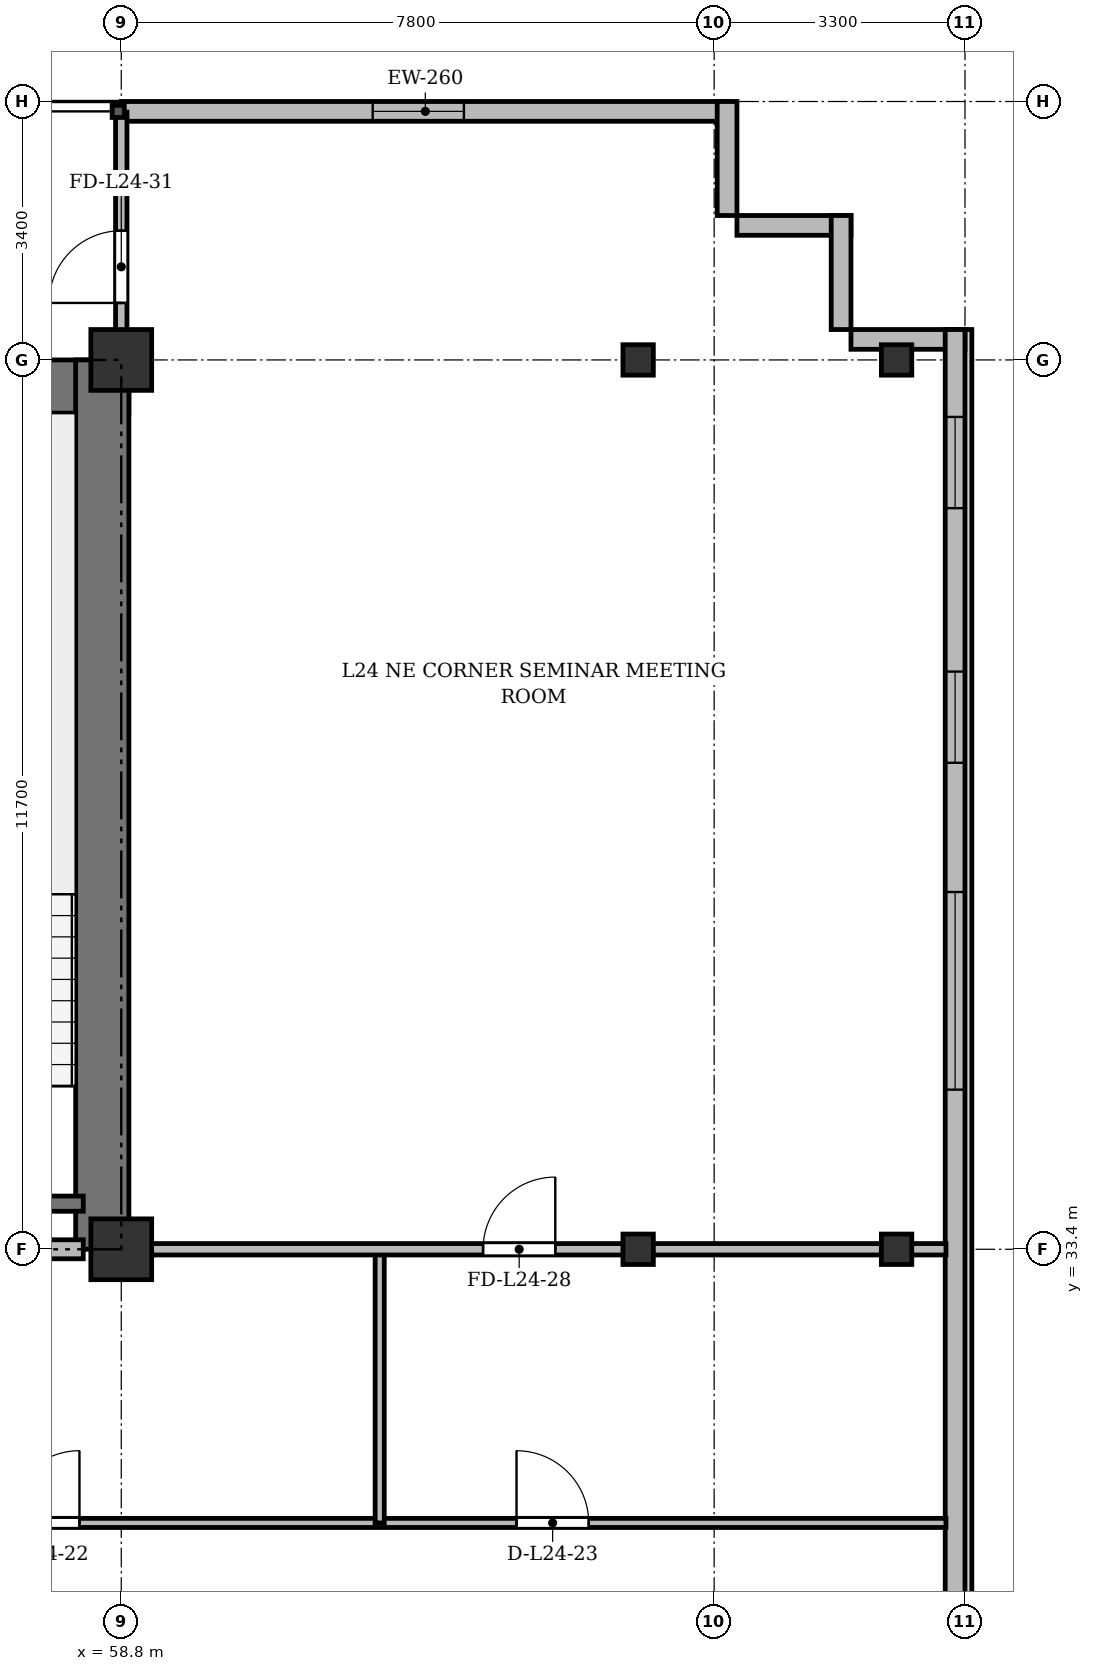
"""IFC4 building model, lengths in metres.
Left out: names, types, materials, properties, quantities, classifications, styles, units other than length and angle.
Written with IfcOpenShell. Run it as: python <this file> out.ifc"""

import sys

from ifc_helpers import new_model, si_unit, direction, frame, frame_2d, origin, origin_2d, place, context, subcontext, project, spatial, rectangle, i_section, extrude, source, transform, mapped, element, fill, save


model = new_model("IFC4")
c1 = context("Model", 3, precision=1e-05, world=origin(), true_north=direction((0.0, 1.0)))
c2 = subcontext(c1, "Body", "Model", "MODEL_VIEW")
j1 = project(units=[si_unit("LENGTHUNIT", "METRE"), si_unit("PLANEANGLEUNIT", "RADIAN")], contexts=[c1])
p1 = place(None, origin())
s1 = spatial("IfcSite", under=j1, at=p1, CompositionType="ELEMENT")
p2 = place(p1, origin())
s2 = spatial("IfcBuilding", under=s1, at=p2, CompositionType="ELEMENT")
p3 = place(p2, frame((0.0, 0.0, 96.1)))
s3 = spatial("IfcBuildingStorey", under=s2, at=p3, CompositionType="ELEMENT", Elevation=96.1)
m1 = source(origin(), c2, "Body", "SweptSolid", [
    extrude(rectangle(XDim=0.8, YDim=0.8, at=origin_2d()), origin(), (0.0, 0.0, 1.0), 3.6),
])
for number, where, z_axis, x_axis in (
    (1, (58.8, 33.4, 0.0), (0.0, 0.0, 1.0), (1.0, 0.0, 0.0)),
    (2, (58.8, 45.1, 0.0), (0.0, 0.0, 1.0), (1.0, 0.0, 0.0)),
):
    element("IfcColumn", number, at=place(p3, frame(where, z_axis=z_axis, x_axis=x_axis)), inside=s3, PredefinedType="COLUMN", context=c2, shape_type="MappedRepresentation", body=[
        mapped(m1, transform((0.0, 0.0, 0.0), x_axis=(1.0, 0.0, 0.0), y_axis=(0.0, 1.0, 0.0), z_axis=(0.0, 0.0, 1.0), scale=1.0)),
    ])
m2 = source(origin(), c2, "Body", "SweptSolid", [
    extrude(i_section(OverallWidth=0.4, OverallDepth=0.4, WebThickness=0.022, FlangeThickness=0.035, at=origin_2d()), origin(), (0.0, 0.0, 1.0), 3.6),
])
for number, where, z_axis, x_axis in (
    (3, (65.6, 33.4, 0.0), (0.0, 0.0, 1.0), (1.0, 0.0, 0.0)),
    (4, (65.6, 45.1, 0.0), (0.0, 0.0, 1.0), (1.0, 0.0, 0.0)),
    (5, (69.0, 33.4, 0.0), (0.0, 0.0, 1.0), (1.0, 0.0, 0.0)),
    (6, (69.0, 45.1, 0.0), (0.0, 0.0, 1.0), (1.0, 0.0, 0.0)),
):
    element("IfcColumn", number, at=place(p3, frame(where, z_axis=z_axis, x_axis=x_axis)), inside=s3, PredefinedType="COLUMN", context=c2, shape_type="MappedRepresentation", body=[
        mapped(m2, transform((0.0, 0.0, 0.0), x_axis=(1.0, 0.0, 0.0), y_axis=(0.0, 1.0, 0.0), z_axis=(0.0, 0.0, 1.0), scale=1.0)),
    ])
p4 = place(p3, frame((58.8, 48.37, 0.0), z_axis=(0.0, 0.0, 1.0), x_axis=(1.0, 0.0, 0.0)))
e7 = element("IfcWall", 7, at=p4, inside=s3, PredefinedType="SOLIDWALL", context=c2, shape_type="SweptSolid", body=[
    extrude(rectangle(XDim=8.0, YDim=0.26, at=frame_2d((4.0, 0.0))), origin(), (0.0, 0.0, 1.0), 3.34),
])
p5 = place(p4, frame((3.308, 0.0, 0.9)))
e8 = element("IfcOpeningElement", 8, at=p5, cuts=e7, PredefinedType="OPENING", context=c2, shape_type="SweptSolid", body=[
    extrude(rectangle(XDim=1.2, YDim=1.65, at=frame_2d((0.6, 0.825))), frame((0.0, 0.14, 0.0), z_axis=(0.0, -1.0, 0.0), x_axis=(1.0, 0.0, 0.0)), (0.0, 0.0, 1.0), 0.28),
])
for number, where, z_axis, x_axis in (
    (9, (66.77, 48.5, 0.0), (0.0, 0.0, 1.0), (0.0, -1.0, 0.0)),
    (10, (66.9, 46.87, 0.0), (0.0, 0.0, 1.0), (1.0, 0.0, 0.0)),
    (11, (68.27, 47.0, 0.0), (0.0, 0.0, 1.0), (0.0, -1.0, 0.0)),
):
    element("IfcWall", number, at=place(p3, frame(where, z_axis=z_axis, x_axis=x_axis)), inside=s3, PredefinedType="SOLIDWALL", context=c2, shape_type="SweptSolid", body=[
        extrude(rectangle(XDim=1.5, YDim=0.26, at=frame_2d((0.75, 0.0))), origin(), (0.0, 0.0, 1.0), 3.34),
    ])
p6 = place(p3, frame((68.4, 45.37, 0.0), z_axis=(0.0, 0.0, 1.0), x_axis=(1.0, 0.0, 0.0)))
e12 = element("IfcWall", 12, at=p6, inside=s3, PredefinedType="SOLIDWALL", context=c2, shape_type="SweptSolid", body=[
    extrude(rectangle(XDim=1.5, YDim=0.26, at=frame_2d((0.75, 0.0))), origin(), (0.0, 0.0, 1.0), 2.752),
])
p7 = place(p3, frame((69.77, 45.5, 0.0), z_axis=(0.0, 0.0, 1.0), x_axis=(0.0, -1.0, 0.0)))
e13 = element("IfcWall", 13, at=p7, inside=s3, PredefinedType="SOLIDWALL", context=c2, shape_type="SweptSolid", body=[
    extrude(rectangle(XDim=39.6, YDim=0.26, at=frame_2d((19.8, 0.0))), origin(), (0.0, 0.0, 1.0), 3.34),
])
p8 = place(p7, frame((36.95, 0.0, 0.92)))
e14 = element("IfcOpeningElement", 14, at=p8, cuts=e13, PredefinedType="OPENING", context=c2, shape_type="SweptSolid", body=[
    extrude(rectangle(XDim=1.2, YDim=1.65, at=frame_2d((0.6, 0.825))), frame((0.0, 0.14, 0.0), z_axis=(0.0, -1.0, 0.0), x_axis=(1.0, 0.0, 0.0)), (0.0, 0.0, 1.0), 0.28),
])
p9 = place(p7, frame((32.8, 0.0, 0.92)))
e15 = element("IfcOpeningElement", 15, at=p9, cuts=e13, PredefinedType="OPENING", context=c2, shape_type="SweptSolid", body=[
    extrude(rectangle(XDim=2.6, YDim=1.9, at=frame_2d((1.3, 0.95))), frame((0.0, 0.14, 0.0), z_axis=(0.0, -1.0, 0.0), x_axis=(1.0, 0.0, 0.0)), (0.0, 0.0, 1.0), 0.28),
])
p10 = place(p7, frame((28.6, 0.0, 0.92)))
e16 = element("IfcOpeningElement", 16, at=p10, cuts=e13, PredefinedType="OPENING", context=c2, shape_type="SweptSolid", body=[
    extrude(rectangle(XDim=2.6, YDim=1.9, at=frame_2d((1.3, 0.95))), frame((0.0, 0.14, 0.0), z_axis=(0.0, -1.0, 0.0), x_axis=(1.0, 0.0, 0.0)), (0.0, 0.0, 1.0), 0.28),
])
p11 = place(p7, frame((21.4, 0.0, 0.92)))
e17 = element("IfcOpeningElement", 17, at=p11, cuts=e13, PredefinedType="OPENING", context=c2, shape_type="SweptSolid", body=[
    extrude(rectangle(XDim=2.6, YDim=1.9, at=frame_2d((1.3, 0.95))), frame((0.0, 0.14, 0.0), z_axis=(0.0, -1.0, 0.0), x_axis=(1.0, 0.0, 0.0)), (0.0, 0.0, 1.0), 0.28),
])
p12 = place(p7, frame((7.4, 0.0, 0.92)))
e18 = element("IfcOpeningElement", 18, at=p12, cuts=e13, PredefinedType="OPENING", context=c2, shape_type="SweptSolid", body=[
    extrude(rectangle(XDim=2.6, YDim=1.9, at=frame_2d((1.3, 0.95))), frame((0.0, 0.14, 0.0), z_axis=(0.0, -1.0, 0.0), x_axis=(1.0, 0.0, 0.0)), (0.0, 0.0, 1.0), 0.28),
])
p13 = place(p7, frame((4.5, 0.0, 0.92)))
e19 = element("IfcOpeningElement", 19, at=p13, cuts=e13, PredefinedType="OPENING", context=c2, shape_type="SweptSolid", body=[
    extrude(rectangle(XDim=1.2, YDim=1.65, at=frame_2d((0.6, 0.825))), frame((0.0, 0.14, 0.0), z_axis=(0.0, -1.0, 0.0), x_axis=(1.0, 0.0, 0.0)), (0.0, 0.0, 1.0), 0.28),
])
p14 = place(p7, frame((1.15, 0.0, 0.92)))
e20 = element("IfcOpeningElement", 20, at=p14, cuts=e13, PredefinedType="OPENING", context=c2, shape_type="SweptSolid", body=[
    extrude(rectangle(XDim=1.2, YDim=1.65, at=frame_2d((0.6, 0.825))), frame((0.0, 0.14, 0.0), z_axis=(0.0, -1.0, 0.0), x_axis=(1.0, 0.0, 0.0)), (0.0, 0.0, 1.0), 0.28),
])
p15 = place(p3, frame((15.5, 44.75, 0.0), z_axis=(0.0, 0.0, 1.0), x_axis=(1.0, 0.0, 0.0)))
e21 = element("IfcWall", 21, at=p15, inside=s3, PredefinedType="SHEAR", context=c2, shape_type="SweptSolid", body=[
    extrude(rectangle(XDim=43.4, YDim=0.7, at=frame_2d((21.7, 0.0))), origin(), (0.0, 0.0, 1.0), 3.34),
])
p16 = place(p3, frame((58.55, 33.4, 0.0), z_axis=(0.0, 0.0, 1.0), x_axis=(0.0, 1.0, 0.0)))
e22 = element("IfcWall", 22, at=p16, inside=s3, PredefinedType="SHEAR", context=c2, shape_type="SweptSolid", body=[
    extrude(rectangle(XDim=11.7, YDim=0.7, at=frame_2d((5.85, 0.0))), origin(), (0.0, 0.0, 1.0), 3.34),
])
p17 = place(p3, frame((54.9, 34.0, 0.0), z_axis=(0.0, 0.0, 1.0), x_axis=(1.0, 0.0, 0.0)))
e23 = element("IfcWall", 23, at=p17, inside=s3, PredefinedType="SHEAR", context=c2, shape_type="SweptSolid", body=[
    extrude(rectangle(XDim=3.4, YDim=0.2, at=frame_2d((1.7, 0.0))), origin(), (0.0, 0.0, 1.0), 3.34),
])
p18 = place(p3, frame((47.15, 33.4, 0.0), z_axis=(0.0, 0.0, 1.0), x_axis=(1.0, 0.0, 0.0)))
e24 = element("IfcWall", 24, at=p18, inside=s3, PredefinedType="PARTITIONING", context=c2, shape_type="SweptSolid", body=[
    extrude(rectangle(XDim=11.15, YDim=0.25, at=frame_2d((5.575, 0.0))), origin(), (0.0, 0.0, 1.0), 2.752),
])
p19 = place(p18, frame((0.7, 0.0, 0.0)))
e25 = element("IfcOpeningElement", 25, at=p19, cuts=e24, PredefinedType="OPENING", context=c2, shape_type="SweptSolid", body=[
    extrude(rectangle(XDim=0.95, YDim=2.15, at=frame_2d((0.475, 1.075))), frame((0.0, 0.135, 0.0), z_axis=(0.0, -1.0, 0.0), x_axis=(1.0, 0.0, 0.0)), (0.0, 0.0, 1.0), 0.27),
])
p20 = place(p18, frame((6.0, 0.0, 0.0)))
e26 = element("IfcOpeningElement", 26, at=p20, cuts=e24, PredefinedType="OPENING", context=c2, shape_type="SweptSolid", body=[
    extrude(rectangle(XDim=1.2, YDim=2.15, at=frame_2d((0.6, 1.075))), frame((0.0, 0.135, 0.0), z_axis=(0.0, -1.0, 0.0), x_axis=(1.0, 0.0, 0.0)), (0.0, 0.0, 1.0), 0.27),
])
p21 = place(p3, frame((54.8, 29.8, 0.0), z_axis=(0.0, 0.0, 1.0), x_axis=(1.0, 0.0, 0.0)))
e27 = element("IfcWall", 27, at=p21, inside=s3, PredefinedType="PARTITIONING", context=c2, shape_type="SweptSolid", body=[
    extrude(rectangle(XDim=14.85, YDim=0.12, at=frame_2d((7.425, 0.0))), origin(), (0.0, 0.0, 1.0), 2.84),
])
p22 = place(p21, frame((2.5, 0.0, 0.0)))
e28 = element("IfcOpeningElement", 28, at=p22, cuts=e27, PredefinedType="OPENING", context=c2, shape_type="SweptSolid", body=[
    extrude(rectangle(XDim=0.95, YDim=2.15, at=frame_2d((0.475, 1.075))), frame((0.0, 0.07, 0.0), z_axis=(0.0, -1.0, 0.0), x_axis=(1.0, 0.0, 0.0)), (0.0, 0.0, 1.0), 0.14),
])
p23 = place(p21, frame((9.2, 0.0, 0.0)))
e29 = element("IfcOpeningElement", 29, at=p23, cuts=e27, PredefinedType="OPENING", context=c2, shape_type="SweptSolid", body=[
    extrude(rectangle(XDim=0.95, YDim=2.15, at=frame_2d((0.475, 1.075))), frame((0.0, 0.07, 0.0), z_axis=(0.0, -1.0, 0.0), x_axis=(1.0, 0.0, 0.0)), (0.0, 0.0, 1.0), 0.14),
])
p24 = place(p3, frame((62.2, 29.8, 0.0), z_axis=(0.0, 0.0, 1.0), x_axis=(0.0, 1.0, 0.0)))
e30 = element("IfcWall", 30, at=p24, inside=s3, PredefinedType="PARTITIONING", context=c2, shape_type="SweptSolid", body=[
    extrude(rectangle(XDim=3.6, YDim=0.12, at=frame_2d((1.8, 0.0))), origin(), (0.0, 0.0, 1.0), 2.752),
])
p25 = place(p3, frame((58.8, 33.4, 0.0), z_axis=(0.0, 0.0, 1.0), x_axis=(1.0, 0.0, 0.0)))
e31 = element("IfcWall", 31, at=p25, inside=s3, PredefinedType="PARTITIONING", context=c2, shape_type="SweptSolid", body=[
    extrude(rectangle(XDim=10.85, YDim=0.15, at=frame_2d((5.425, 0.0))), origin(), (0.0, 0.0, 1.0), 2.752),
])
p26 = place(p25, frame((4.76, 0.0, 0.0)))
e32 = element("IfcOpeningElement", 32, at=p26, cuts=e31, PredefinedType="OPENING", context=c2, shape_type="SweptSolid", body=[
    extrude(rectangle(XDim=0.95, YDim=2.15, at=frame_2d((0.475, 1.075))), frame((0.0, 0.085, 0.0), z_axis=(0.0, -1.0, 0.0), x_axis=(1.0, 0.0, 0.0)), (0.0, 0.0, 1.0), 0.17),
])
p27 = place(p3, frame((58.8, 44.75, 0.0), z_axis=(0.0, 0.0, 1.0), x_axis=(0.0, 1.0, 0.0)))
e33 = element("IfcWall", 33, at=p27, inside=s3, PredefinedType="PARTITIONING", context=c2, shape_type="SweptSolid", body=[
    extrude(rectangle(XDim=3.61, YDim=0.15, at=frame_2d((1.805, 0.0))), origin(), (0.0, 0.0, 1.0), 2.84),
])
p28 = place(p27, frame((1.1, 0.0, 0.0)))
e34 = element("IfcOpeningElement", 34, at=p28, cuts=e33, PredefinedType="OPENING", context=c2, shape_type="SweptSolid", body=[
    extrude(rectangle(XDim=0.95, YDim=2.15, at=frame_2d((0.475, 1.075))), frame((0.0, 0.085, 0.0), z_axis=(0.0, -1.0, 0.0), x_axis=(1.0, 0.0, 0.0)), (0.0, 0.0, 1.0), 0.17),
])
m3 = source(origin(), c2, "Body", "SweptSolid", [
    extrude(rectangle(XDim=1.2, YDim=1.65, at=frame_2d((0.6, 0.825))), frame((0.0, 0.03, 0.0), z_axis=(0.0, -1.0, 0.0), x_axis=(1.0, 0.0, 0.0)), (0.0, 0.0, 1.0), 0.06),
])
p29 = place(p5, origin())
e35 = element("IfcWindow", 35, at=p29, inside=s3, PartitioningType="SINGLE_PANEL", PredefinedType="WINDOW", context=c2, shape_type="MappedRepresentation", body=[
    mapped(m3, transform((0.0, 0.0, 0.0), x_axis=(1.0, 0.0, 0.0), y_axis=(0.0, 1.0, 0.0), z_axis=(0.0, 0.0, 1.0), scale=1.0)),
])
fill(e8, e35)
m4 = source(origin(), c2, "Body", "SweptSolid", [
    extrude(rectangle(XDim=2.6, YDim=1.9, at=frame_2d((1.3, 0.95))), frame((0.0, 0.03, 0.0), z_axis=(0.0, -1.0, 0.0), x_axis=(1.0, 0.0, 0.0)), (0.0, 0.0, 1.0), 0.06),
])
p30 = place(p12, origin())
e36 = element("IfcWindow", 36, at=p30, inside=s3, PartitioningType="SINGLE_PANEL", PredefinedType="WINDOW", context=c2, shape_type="MappedRepresentation", body=[
    mapped(m4, transform((0.0, 0.0, 0.0), x_axis=(1.0, 0.0, 0.0), y_axis=(0.0, 1.0, 0.0), z_axis=(0.0, 0.0, 1.0), scale=1.0)),
])
fill(e18, e36)
p31 = place(p13, origin())
e37 = element("IfcWindow", 37, at=p31, inside=s3, PartitioningType="SINGLE_PANEL", PredefinedType="WINDOW", context=c2, shape_type="MappedRepresentation", body=[
    mapped(m3, transform((0.0, 0.0, 0.0), x_axis=(1.0, 0.0, 0.0), y_axis=(0.0, 1.0, 0.0), z_axis=(0.0, 0.0, 1.0), scale=1.0)),
])
fill(e19, e37)
p32 = place(p14, origin())
e38 = element("IfcWindow", 38, at=p32, inside=s3, PartitioningType="SINGLE_PANEL", PredefinedType="WINDOW", context=c2, shape_type="MappedRepresentation", body=[
    mapped(m3, transform((0.0, 0.0, 0.0), x_axis=(1.0, 0.0, 0.0), y_axis=(0.0, 1.0, 0.0), z_axis=(0.0, 0.0, 1.0), scale=1.0)),
])
fill(e20, e38)
m5 = source(origin(), c2, "Body", "SweptSolid", [
    extrude(rectangle(XDim=0.95, YDim=2.15, at=frame_2d((0.475, 1.075))), frame((0.0, 0.025, 0.0), z_axis=(0.0, -1.0, 0.0), x_axis=(1.0, 0.0, 0.0)), (0.0, 0.0, 1.0), 0.05),
])
p33 = place(p22, origin())
e39 = element("IfcDoor", 39, at=p33, inside=s3, OperationType="SINGLE_SWING_RIGHT", PredefinedType="DOOR", context=c2, shape_type="MappedRepresentation", body=[
    mapped(m5, transform((0.0, 0.0, 0.0), x_axis=(1.0, 0.0, 0.0), y_axis=(0.0, 1.0, 0.0), z_axis=(0.0, 0.0, 1.0), scale=1.0)),
])
fill(e28, e39)
p34 = place(p23, origin())
e40 = element("IfcDoor", 40, at=p34, inside=s3, OperationType="SINGLE_SWING_LEFT", PredefinedType="DOOR", context=c2, shape_type="MappedRepresentation", body=[
    mapped(m5, transform((0.0, 0.0, 0.0), x_axis=(1.0, 0.0, 0.0), y_axis=(0.0, 1.0, 0.0), z_axis=(0.0, 0.0, 1.0), scale=1.0)),
])
fill(e29, e40)
p35 = place(p26, origin())
e41 = element("IfcDoor", 41, at=p35, inside=s3, OperationType="SINGLE_SWING_RIGHT", PredefinedType="DOOR", context=c2, shape_type="MappedRepresentation", body=[
    mapped(m5, transform((0.0, 0.0, 0.0), x_axis=(1.0, 0.0, 0.0), y_axis=(0.0, 1.0, 0.0), z_axis=(0.0, 0.0, 1.0), scale=1.0)),
])
fill(e32, e41)
p36 = place(p28, origin())
e42 = element("IfcDoor", 42, at=p36, inside=s3, OperationType="SINGLE_SWING_LEFT", PredefinedType="DOOR", context=c2, shape_type="MappedRepresentation", body=[
    mapped(m5, transform((0.0, 0.0, 0.0), x_axis=(1.0, 0.0, 0.0), y_axis=(0.0, 1.0, 0.0), z_axis=(0.0, 0.0, 1.0), scale=1.0)),
])
fill(e34, e42)
save(model, sys.argv[1])
